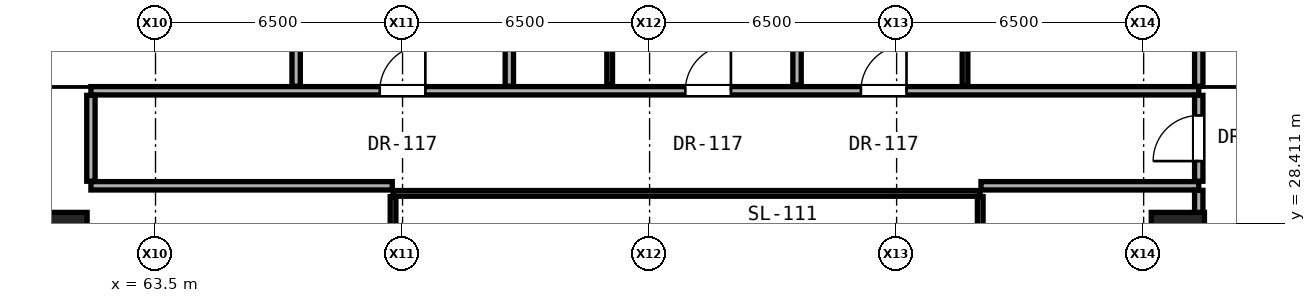
"""IFC4 building model, lengths in metres.
Left out: names, types, materials, properties, quantities, classifications, styles, units other than length and angle.
Written with IfcOpenShell. Run it as: python <this file> out.ifc"""

import sys

from ifc_helpers import new_model, si_unit, direction, frame, frame_2d, origin, origin_2d, place, context, subcontext, project, spatial, rectangle, hollow_rectangle, extrude, element, fill, save


model = new_model("IFC4")
c1 = context("Model", 3, precision=1e-05, world=origin(), true_north=direction((0.0, 1.0)))
c2 = subcontext(c1, "Body", "Model", "MODEL_VIEW")
j1 = project(units=[si_unit("LENGTHUNIT", "METRE"), si_unit("PLANEANGLEUNIT", "RADIAN")], contexts=[c1])
p1 = place(None, origin())
s1 = spatial("IfcSite", under=j1, at=p1, CompositionType="ELEMENT")
p2 = place(p1, origin())
s2 = spatial("IfcBuilding", under=s1, at=p2, CompositionType="ELEMENT")
p3 = place(p2, origin())
s3 = spatial("IfcBuildingStorey", under=s2, at=p3, CompositionType="ELEMENT", Elevation=0.0)
for number, where, z_axis, x_axis in (
    (1, (61.0, 28.0, 0.0), (0.0, 0.0, 1.0), (1.0, 0.0, 0.0)),
    (2, (90.4, 28.0, 0.0), (0.0, 0.0, 1.0), (1.0, 0.0, 0.0)),
):
    element("IfcColumn", number, at=place(p3, frame(where, z_axis=z_axis, x_axis=x_axis)), inside=s3, PredefinedType="COLUMN", context=c2, shape_type="SweptSolid", body=[
        extrude(hollow_rectangle(XDim=1.4, YDim=1.4, WallThickness=0.08, at=origin_2d()), origin(), (0.0, 0.0, 1.0), 5.2),
    ])
p4 = place(p3, frame((69.75, 29.2, 0.0), z_axis=(0.0, 0.0, 1.0), x_axis=(1.0, 0.0, 0.0)))
e3 = element("IfcWall", 3, at=p4, inside=s3, PredefinedType="PARTITIONING", context=c2, shape_type="SweptSolid", body=[
    extrude(rectangle(XDim=15.45, YDim=0.15, at=frame_2d((7.725, 0.0))), origin(), (0.0, 0.0, 1.0), 3.945),
])
p5 = place(p3, frame((61.8, 29.4, 0.0), z_axis=(0.0, 0.0, 1.0), x_axis=(1.0, 0.0, 0.0)))
e4 = element("IfcWall", 4, at=p5, inside=s3, PredefinedType="SOLIDWALL", context=c2, shape_type="SweptSolid", body=[
    extrude(rectangle(XDim=7.93, YDim=0.22, at=frame_2d((3.965, 0.0))), origin(), (0.0, 0.0, 1.0), 3.945),
])
p6 = place(p3, frame((85.22, 29.4, 0.0), z_axis=(0.0, 0.0, 1.0), x_axis=(1.0, 0.0, 0.0)))
e5 = element("IfcWall", 5, at=p6, inside=s3, PredefinedType="SOLIDWALL", context=c2, shape_type="SweptSolid", body=[
    extrude(rectangle(XDim=5.73, YDim=0.22, at=frame_2d((2.865, 0.0))), origin(), (0.0, 0.0, 1.0), 4.016),
])
p7 = place(p3, frame((61.8, 31.9, 0.0), z_axis=(0.0, 0.0, 1.0), x_axis=(1.0, 0.0, 0.0)))
e6 = element("IfcWall", 6, at=p7, inside=s3, PredefinedType="SOLIDWALL", context=c2, shape_type="SweptSolid", body=[
    extrude(rectangle(XDim=29.15, YDim=0.22, at=frame_2d((14.575, 0.0))), origin(), (0.0, 0.0, 1.0), 3.945),
])
p8 = place(p7, frame((7.6, 0.0, 0.0)))
e7 = element("IfcOpeningElement", 7, at=p8, cuts=e6, PredefinedType="OPENING", context=c2, shape_type="SweptSolid", body=[
    extrude(rectangle(XDim=1.2, YDim=2.25, at=frame_2d((0.6, 1.125))), frame((0.0, 0.12, 0.0), z_axis=(0.0, -1.0, 0.0), x_axis=(1.0, 0.0, 0.0)), (0.0, 0.0, 1.0), 0.24),
])
p9 = place(p7, frame((20.26, 0.0, 0.0)))
e8 = element("IfcOpeningElement", 8, at=p9, cuts=e6, PredefinedType="OPENING", context=c2, shape_type="SweptSolid", body=[
    extrude(rectangle(XDim=1.2, YDim=2.25, at=frame_2d((0.6, 1.125))), frame((0.0, 0.12, 0.0), z_axis=(0.0, -1.0, 0.0), x_axis=(1.0, 0.0, 0.0)), (0.0, 0.0, 1.0), 0.24),
])
p10 = place(p7, frame((15.64, 0.0, 0.0)))
e9 = element("IfcOpeningElement", 9, at=p10, cuts=e6, PredefinedType="OPENING", context=c2, shape_type="SweptSolid", body=[
    extrude(rectangle(XDim=1.2, YDim=2.25, at=frame_2d((0.6, 1.125))), frame((0.0, 0.12, 0.0), z_axis=(0.0, -1.0, 0.0), x_axis=(1.0, 0.0, 0.0)), (0.0, 0.0, 1.0), 0.24),
])
p11 = place(p3, frame((61.8, 29.52, 0.0), z_axis=(0.0, 0.0, 1.0), x_axis=(0.0, 1.0, 0.0)))
e10 = element("IfcWall", 10, at=p11, inside=s3, PredefinedType="SOLIDWALL", context=c2, shape_type="SweptSolid", body=[
    extrude(rectangle(XDim=2.26, YDim=0.22, at=frame_2d((1.13, 0.0))), origin(), (0.0, 0.0, 1.0), 4.88),
])
p12 = place(p3, frame((67.2, 32.02, 0.0), z_axis=(0.0, 0.0, 1.0), x_axis=(0.0, 1.0, 0.0)))
e11 = element("IfcWall", 11, at=p12, inside=s3, PredefinedType="SOLIDWALL", context=c2, shape_type="SweptSolid", body=[
    extrude(rectangle(XDim=3.18, YDim=0.22, at=frame_2d((1.59, 0.0))), origin(), (0.0, 0.0, 1.0), 3.772),
])
p13 = place(p3, frame((69.75, 25.885, 0.0), z_axis=(0.0, 0.0, 1.0), x_axis=(0.0, 1.0, 0.0)))
e12 = element("IfcWall", 12, at=p13, inside=s3, PredefinedType="PARTITIONING", context=c2, shape_type="SweptSolid", body=[
    extrude(rectangle(XDim=3.23, YDim=0.15, at=frame_2d((1.615, 0.0))), origin(), (0.0, 0.0, 1.0), 3.945),
])
p14 = place(p3, frame((72.81, 32.02, 0.0), z_axis=(0.0, 0.0, 1.0), x_axis=(0.0, 1.0, 0.0)))
e13 = element("IfcWall", 13, at=p14, inside=s3, PredefinedType="SOLIDWALL", context=c2, shape_type="SweptSolid", body=[
    extrude(rectangle(XDim=2.81, YDim=0.22, at=frame_2d((1.405, 0.0))), origin(), (0.0, 0.0, 1.0), 4.88),
])
p15 = place(p14, frame((0.98, 0.0, 0.0)))
e14 = element("IfcOpeningElement", 14, at=p15, cuts=e13, PredefinedType="OPENING", context=c2, shape_type="SweptSolid", body=[
    extrude(rectangle(XDim=0.85, YDim=2.01, at=frame_2d((0.425, 1.005))), frame((0.0, 0.12, 0.0), z_axis=(0.0, -1.0, 0.0), x_axis=(1.0, 0.0, 0.0)), (0.0, 0.0, 1.0), 0.24),
])
p16 = place(p3, frame((75.45, 32.05, 0.0), z_axis=(0.0, 0.0, 1.0), x_axis=(0.0, 1.0, 0.0)))
e15 = element("IfcWall", 15, at=p16, inside=s3, PredefinedType="PARTITIONING", context=c2, shape_type="SweptSolid", body=[
    extrude(rectangle(XDim=2.78, YDim=0.15, at=frame_2d((1.39, 0.0))), origin(), (0.0, 0.0, 1.0), 4.88),
])
p17 = place(p3, frame((80.38, 32.05, 0.0), z_axis=(0.0, 0.0, 1.0), x_axis=(0.0, 1.0, 0.0)))
e16 = element("IfcWall", 16, at=p17, inside=s3, PredefinedType="SOLIDWALL", context=c2, shape_type="SweptSolid", body=[
    extrude(rectangle(XDim=2.78, YDim=0.22, at=frame_2d((1.39, 0.0))), origin(), (0.0, 0.0, 1.0), 4.88),
])
p18 = place(p3, frame((84.8, 32.02, 0.0), z_axis=(0.0, 0.0, 1.0), x_axis=(0.0, 1.0, 0.0)))
e17 = element("IfcWall", 17, at=p18, inside=s3, PredefinedType="PARTITIONING", context=c2, shape_type="SweptSolid", body=[
    extrude(rectangle(XDim=2.81, YDim=0.15, at=frame_2d((1.405, 0.0))), origin(), (0.0, 0.0, 1.0), 3.945),
])
p19 = place(p3, frame((85.2, 23.4, 0.0), z_axis=(0.0, 0.0, 1.0), x_axis=(0.0, 1.0, 0.0)))
e18 = element("IfcWall", 18, at=p19, inside=s3, PredefinedType="PARTITIONING", context=c2, shape_type="SweptSolid", body=[
    extrude(rectangle(XDim=5.715, YDim=0.15, at=frame_2d((2.857, 0.0))), origin(), (0.0, 0.0, 1.0), 3.945),
])
p20 = place(p3, frame((90.95, 23.32, 0.0), z_axis=(0.0, 0.0, 1.0), x_axis=(0.0, 1.0, 0.0)))
e19 = element("IfcWall", 19, at=p20, inside=s3, PredefinedType="SOLIDWALL", context=c2, shape_type="SweptSolid", body=[
    extrude(rectangle(XDim=5.96, YDim=0.22, at=frame_2d((2.98, 0.0))), origin(), (0.0, 0.0, 1.0), 4.099),
])
p21 = place(p3, frame((90.95, 29.52, 0.0), z_axis=(0.0, 0.0, 1.0), x_axis=(0.0, 1.0, 0.0)))
e20 = element("IfcWall", 20, at=p21, inside=s3, PredefinedType="SOLIDWALL", context=c2, shape_type="SweptSolid", body=[
    extrude(rectangle(XDim=2.26, YDim=0.22, at=frame_2d((1.13, 0.0))), origin(), (0.0, 0.0, 1.0), 4.88),
])
p22 = place(p21, frame((0.53, 0.0, 0.0)))
e21 = element("IfcOpeningElement", 21, at=p22, cuts=e20, PredefinedType="OPENING", context=c2, shape_type="SweptSolid", body=[
    extrude(rectangle(XDim=1.2, YDim=2.25, at=frame_2d((0.6, 1.125))), frame((0.0, 0.12, 0.0), z_axis=(0.0, -1.0, 0.0), x_axis=(1.0, 0.0, 0.0)), (0.0, 0.0, 1.0), 0.24),
])
p23 = place(p3, frame((90.95, 32.02, 0.0), z_axis=(0.0, 0.0, 1.0), x_axis=(0.0, 1.0, 0.0)))
e22 = element("IfcWall", 22, at=p23, inside=s3, PredefinedType="SOLIDWALL", context=c2, shape_type="SweptSolid", body=[
    extrude(rectangle(XDim=21.83, YDim=0.22, at=frame_2d((10.915, 0.0))), origin(), (0.0, 0.0, 1.0), 4.016),
])
p24 = place(p22, origin())
e23 = element("IfcDoor", 23, at=p24, inside=s3, OperationType="SINGLE_SWING_LEFT", PredefinedType="DOOR", context=c2, shape_type="SweptSolid", body=[
    extrude(rectangle(XDim=1.2, YDim=2.25, at=frame_2d((0.6, 1.125))), frame((0.0, 0.025, 0.0), z_axis=(0.0, -1.0, 0.0), x_axis=(1.0, 0.0, 0.0)), (0.0, 0.0, 1.0), 0.05),
])
fill(e21, e23)
p25 = place(p8, origin())
e24 = element("IfcDoor", 24, at=p25, inside=s3, OperationType="SINGLE_SWING_RIGHT", PredefinedType="DOOR", context=c2, shape_type="SweptSolid", body=[
    extrude(rectangle(XDim=1.2, YDim=2.25, at=frame_2d((0.6, 1.125))), frame((0.0, 0.025, 0.0), z_axis=(0.0, -1.0, 0.0), x_axis=(1.0, 0.0, 0.0)), (0.0, 0.0, 1.0), 0.05),
])
fill(e7, e24)
p26 = place(p9, origin())
e25 = element("IfcDoor", 25, at=p26, inside=s3, OperationType="SINGLE_SWING_RIGHT", PredefinedType="DOOR", context=c2, shape_type="SweptSolid", body=[
    extrude(rectangle(XDim=1.2, YDim=2.25, at=frame_2d((0.6, 1.125))), frame((0.0, 0.025, 0.0), z_axis=(0.0, -1.0, 0.0), x_axis=(1.0, 0.0, 0.0)), (0.0, 0.0, 1.0), 0.05),
])
fill(e8, e25)
p27 = place(p10, origin())
e26 = element("IfcDoor", 26, at=p27, inside=s3, OperationType="SINGLE_SWING_RIGHT", PredefinedType="DOOR", context=c2, shape_type="SweptSolid", body=[
    extrude(rectangle(XDim=1.2, YDim=2.25, at=frame_2d((0.6, 1.125))), frame((0.0, 0.025, 0.0), z_axis=(0.0, -1.0, 0.0), x_axis=(1.0, 0.0, 0.0)), (0.0, 0.0, 1.0), 0.05),
])
fill(e9, e26)
save(model, sys.argv[1])
